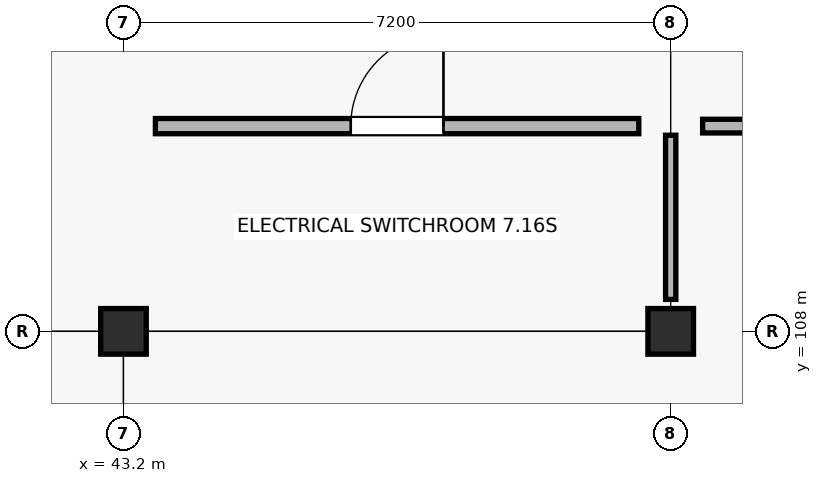
"""IFC4 building model, lengths in metres.
Left out: names, types, materials, properties, quantities, classifications, styles, units other than length and angle.
Written with IfcOpenShell. Run it as: python <this file> out.ifc"""

import sys

from ifc_helpers import new_model, si_unit, direction, frame, frame_2d, origin, origin_2d, place, context, subcontext, project, spatial, rectangle, extrude, element, fill, save


model = new_model("IFC4")
c1 = context("Model", 3, precision=1e-05, world=origin(), true_north=direction((0.0, 1.0)))
c2 = subcontext(c1, "Body", "Model", "MODEL_VIEW")
j1 = project(units=[si_unit("LENGTHUNIT", "METRE"), si_unit("PLANEANGLEUNIT", "RADIAN")], contexts=[c1])
p1 = place(None, origin())
s1 = spatial("IfcSite", under=j1, at=p1, CompositionType="ELEMENT")
p2 = place(p1, origin())
s2 = spatial("IfcBuilding", under=s1, at=p2, CompositionType="ELEMENT")
p3 = place(p2, origin())
s3 = spatial("IfcBuildingStorey", under=s2, at=p3, CompositionType="ELEMENT", Elevation=0.0)
for number, where, z_axis, x_axis in (
    (1, (43.2, 108.0, -0.25), (0.0, 0.0, 1.0), (1.0, 0.0, 0.0)),
    (2, (50.4, 108.0, -0.25), (0.0, 0.0, 1.0), (1.0, 0.0, 0.0)),
):
    element("IfcColumn", number, at=place(p3, frame(where, z_axis=z_axis, x_axis=x_axis)), inside=s3, PredefinedType="COLUMN", context=c2, shape_type="SweptSolid", body=[
        extrude(rectangle(XDim=0.6, YDim=0.6, at=origin_2d()), origin(), (0.0, 0.0, 1.0), 4.75),
    ])
p4 = place(p3, frame((43.62, 110.7, 0.0), z_axis=(0.0, 0.0, 1.0), x_axis=(1.0, 0.0, 0.0)))
e3 = element("IfcWall", 3, at=p4, inside=s3, PredefinedType="SOLIDWALL", context=c2, shape_type="SweptSolid", body=[
    extrude(rectangle(XDim=6.36, YDim=0.2, at=frame_2d((3.18, 0.0))), origin(), (0.0, 0.0, 1.0), 3.36),
])
p5 = place(p4, frame((2.57, 0.0, 0.0)))
e4 = element("IfcOpeningElement", 4, at=p5, cuts=e3, PredefinedType="OPENING", context=c2, shape_type="SweptSolid", body=[
    extrude(rectangle(XDim=1.22, YDim=2.14, at=frame_2d((0.61, 1.07))), frame((0.0, 0.11, 0.0), z_axis=(0.0, -1.0, 0.0), x_axis=(1.0, 0.0, 0.0)), (0.0, 0.0, 1.0), 0.22),
])
p6 = place(p3, frame((50.4, 108.42, 0.0), z_axis=(0.0, 0.0, 1.0), x_axis=(0.0, 1.0, 0.0)))
e5 = element("IfcWall", 5, at=p6, inside=s3, PredefinedType="PARTITIONING", context=c2, shape_type="SweptSolid", body=[
    extrude(rectangle(XDim=2.16, YDim=0.135, at=frame_2d((1.08, 0.0))), origin(), (0.0, 0.0, 1.0), 3.36),
])
p7 = place(p3, frame((50.82, 110.7, 0.0), z_axis=(0.0, 0.0, 1.0), x_axis=(1.0, 0.0, 0.0)))
e6 = element("IfcWall", 6, at=p7, inside=s3, PredefinedType="PARTITIONING", context=c2, shape_type="SweptSolid", body=[
    extrude(rectangle(XDim=6.36, YDim=0.18, at=frame_2d((3.18, 0.0))), origin(), (0.0, 0.0, 1.0), 3.36),
])
p8 = place(p7, frame((2.45, 0.0, 0.0)))
e7 = element("IfcOpeningElement", 7, at=p8, cuts=e6, PredefinedType="OPENING", context=c2, shape_type="SweptSolid", body=[
    extrude(rectangle(XDim=1.46, YDim=2.14, at=frame_2d((0.73, 1.07))), frame((0.0, 0.1, 0.0), z_axis=(0.0, -1.0, 0.0), x_axis=(1.0, 0.0, 0.0)), (0.0, 0.0, 1.0), 0.2),
])
p9 = place(p5, origin())
e8 = element("IfcDoor", 8, at=p9, inside=s3, OperationType="SINGLE_SWING_RIGHT", PredefinedType="DOOR", context=c2, shape_type="SweptSolid", body=[
    extrude(rectangle(XDim=1.22, YDim=2.14, at=frame_2d((0.61, 1.07))), frame((0.0, 0.025, 0.0), z_axis=(0.0, -1.0, 0.0), x_axis=(1.0, 0.0, 0.0)), (0.0, 0.0, 1.0), 0.05),
])
fill(e4, e8)
save(model, sys.argv[1])
